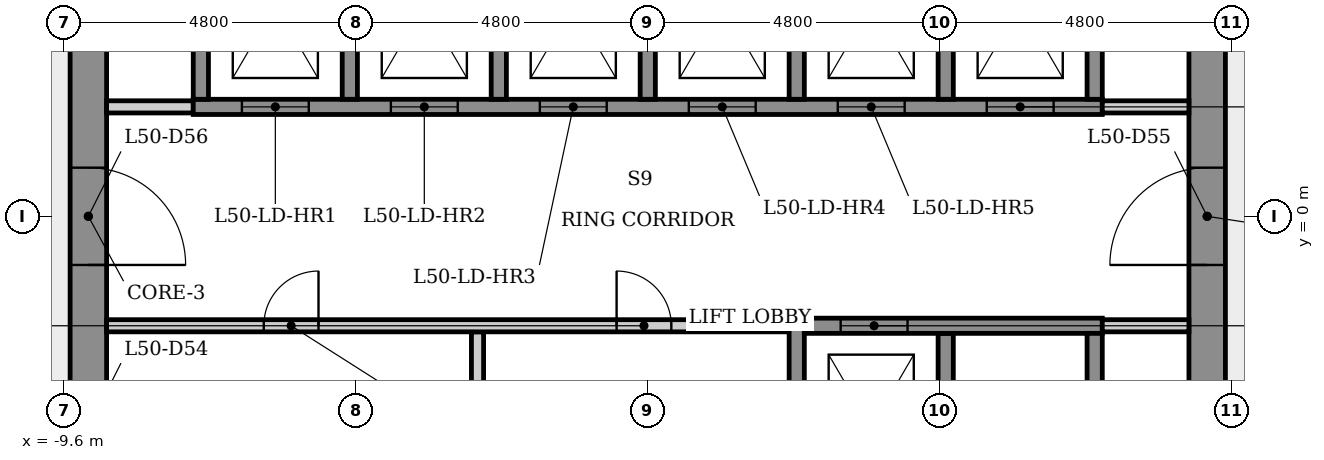
"""IFC4 building model, lengths in metres.
Left out: names, types, materials, properties, quantities, classifications, styles, units other than length and angle.
Written with IfcOpenShell. Run it as: python <this file> out.ifc"""

import sys

from ifc_helpers import new_model, si_unit, direction, frame, frame_2d, origin, place, context, subcontext, project, spatial, rectangle, extrude, element, fill, save


model = new_model("IFC4")
c1 = context("Model", 3, precision=1e-05, world=origin(), true_north=direction((0.0, 1.0)))
c2 = subcontext(c1, "Body", "Model", "MODEL_VIEW")
j1 = project(units=[si_unit("LENGTHUNIT", "METRE"), si_unit("PLANEANGLEUNIT", "RADIAN")], contexts=[c1])
p1 = place(None, origin())
s1 = spatial("IfcSite", under=j1, at=p1, CompositionType="ELEMENT")
p2 = place(p1, origin())
s2 = spatial("IfcBuilding", under=s1, at=p2, CompositionType="ELEMENT")
p3 = place(p2, frame((0.0, 0.0, 186.7)))
s3 = spatial("IfcBuildingStorey", under=s2, at=p3, CompositionType="ELEMENT", Elevation=186.7)
p4 = place(p3, frame((9.2, -5.485, 0.0), z_axis=(0.0, 0.0, 1.0), x_axis=(0.0, 1.0, 0.0)))
e1 = element("IfcWall", 1, at=p4, inside=s3, PredefinedType="SHEAR", context=c2, shape_type="SweptSolid", body=[
    extrude(rectangle(XDim=10.97, YDim=0.6, at=frame_2d((5.485, 0.0))), origin(), (0.0, 0.0, 1.0), 4.0),
])
p5 = place(p4, frame((4.685, 0.0, 0.0)))
e2 = element("IfcOpeningElement", 2, at=p5, cuts=e1, PredefinedType="OPENING", context=c2, shape_type="SweptSolid", body=[
    extrude(rectangle(XDim=1.6, YDim=2.1, at=frame_2d((0.8, 1.05))), frame((0.0, 0.31, 0.0), z_axis=(0.0, -1.0, 0.0), x_axis=(1.0, 0.0, 0.0)), (0.0, 0.0, 1.0), 0.62),
])
p6 = place(p3, frame((-9.2, 5.485, 0.0), z_axis=(0.0, 0.0, 1.0), x_axis=(0.0, -1.0, 0.0)))
e3 = element("IfcWall", 3, at=p6, inside=s3, PredefinedType="SHEAR", context=c2, shape_type="SweptSolid", body=[
    extrude(rectangle(XDim=10.97, YDim=0.6, at=frame_2d((5.485, 0.0))), origin(), (0.0, 0.0, 1.0), 4.0),
])
p7 = place(p6, frame((8.516, 0.0, 0.0)))
e4 = element("IfcOpeningElement", 4, at=p7, cuts=e3, PredefinedType="OPENING", context=c2, shape_type="SweptSolid", body=[
    extrude(rectangle(XDim=0.9, YDim=2.1, at=frame_2d((0.45, 1.05))), frame((0.0, 0.31, 0.0), z_axis=(0.0, -1.0, 0.0), x_axis=(1.0, 0.0, 0.0)), (0.0, 0.0, 1.0), 0.62),
])
p8 = place(p6, frame((4.685, 0.0, 0.0)))
e5 = element("IfcOpeningElement", 5, at=p8, cuts=e3, PredefinedType="OPENING", context=c2, shape_type="SweptSolid", body=[
    extrude(rectangle(XDim=1.6, YDim=2.1, at=frame_2d((0.8, 1.05))), frame((0.0, 0.31, 0.0), z_axis=(0.0, -1.0, 0.0), x_axis=(1.0, 0.0, 0.0)), (0.0, 0.0, 1.0), 0.62),
])
p9 = place(p3, frame((-8.9, 1.8, 0.0), z_axis=(0.0, 0.0, 1.0), x_axis=(1.0, 0.0, 0.0)))
e6 = element("IfcWall", 6, at=p9, inside=s3, PredefinedType="PARTITIONING", context=c2, shape_type="SweptSolid", body=[
    extrude(rectangle(XDim=1.425, YDim=0.2, at=frame_2d((0.712, 0.0))), origin(), (0.0, 0.0, 1.0), 3.6),
])
p10 = place(p3, frame((-7.475, 1.8, 0.0), z_axis=(0.0, 0.0, 1.0), x_axis=(1.0, 0.0, 0.0)))
e7 = element("IfcWall", 7, at=p10, inside=s3, PredefinedType="SHEAR", context=c2, shape_type="SweptSolid", body=[
    extrude(rectangle(XDim=14.95, YDim=0.25, at=frame_2d((7.475, 0.0))), origin(), (0.0, 0.0, 1.0), 3.6),
])
p11 = place(p10, frame((0.8, 0.0, 0.0)))
e8 = element("IfcOpeningElement", 8, at=p11, cuts=e7, PredefinedType="OPENING", context=c2, shape_type="SweptSolid", body=[
    extrude(rectangle(XDim=1.1, YDim=2.1, at=frame_2d((0.55, 1.05))), frame((0.0, 0.135, 0.0), z_axis=(0.0, -1.0, 0.0), x_axis=(1.0, 0.0, 0.0)), (0.0, 0.0, 1.0), 0.27),
])
p12 = place(p10, frame((3.25, 0.0, 0.0)))
e9 = element("IfcOpeningElement", 9, at=p12, cuts=e7, PredefinedType="OPENING", context=c2, shape_type="SweptSolid", body=[
    extrude(rectangle(XDim=1.1, YDim=2.1, at=frame_2d((0.55, 1.05))), frame((0.0, 0.135, 0.0), z_axis=(0.0, -1.0, 0.0), x_axis=(1.0, 0.0, 0.0)), (0.0, 0.0, 1.0), 0.27),
])
p13 = place(p10, frame((5.7, 0.0, 0.0)))
e10 = element("IfcOpeningElement", 10, at=p13, cuts=e7, PredefinedType="OPENING", context=c2, shape_type="SweptSolid", body=[
    extrude(rectangle(XDim=1.1, YDim=2.1, at=frame_2d((0.55, 1.05))), frame((0.0, 0.135, 0.0), z_axis=(0.0, -1.0, 0.0), x_axis=(1.0, 0.0, 0.0)), (0.0, 0.0, 1.0), 0.27),
])
p14 = place(p10, frame((8.15, 0.0, 0.0)))
e11 = element("IfcOpeningElement", 11, at=p14, cuts=e7, PredefinedType="OPENING", context=c2, shape_type="SweptSolid", body=[
    extrude(rectangle(XDim=1.1, YDim=2.1, at=frame_2d((0.55, 1.05))), frame((0.0, 0.135, 0.0), z_axis=(0.0, -1.0, 0.0), x_axis=(1.0, 0.0, 0.0)), (0.0, 0.0, 1.0), 0.27),
])
p15 = place(p10, frame((10.6, 0.0, 0.0)))
e12 = element("IfcOpeningElement", 12, at=p15, cuts=e7, PredefinedType="OPENING", context=c2, shape_type="SweptSolid", body=[
    extrude(rectangle(XDim=1.1, YDim=2.1, at=frame_2d((0.55, 1.05))), frame((0.0, 0.135, 0.0), z_axis=(0.0, -1.0, 0.0), x_axis=(1.0, 0.0, 0.0)), (0.0, 0.0, 1.0), 0.27),
])
p16 = place(p10, frame((13.05, 0.0, 0.0)))
e13 = element("IfcOpeningElement", 13, at=p16, cuts=e7, PredefinedType="OPENING", context=c2, shape_type="SweptSolid", body=[
    extrude(rectangle(XDim=1.1, YDim=2.1, at=frame_2d((0.55, 1.05))), frame((0.0, 0.135, 0.0), z_axis=(0.0, -1.0, 0.0), x_axis=(1.0, 0.0, 0.0)), (0.0, 0.0, 1.0), 0.27),
])
p17 = place(p3, frame((-7.35, 1.925, 0.0), z_axis=(0.0, 0.0, 1.0), x_axis=(0.0, 1.0, 0.0)))
e14 = element("IfcWall", 14, at=p17, inside=s3, PredefinedType="SHEAR", context=c2, shape_type="SweptSolid", body=[
    extrude(rectangle(XDim=4.036, YDim=0.25, at=frame_2d((2.018, 0.0))), origin(), (0.0, 0.0, 1.0), 3.6),
])
p18 = place(p3, frame((-4.9, 5.025, 0.0), z_axis=(0.0, 0.0, 1.0), x_axis=(0.0, -1.0, 0.0)))
e15 = element("IfcWall", 15, at=p18, inside=s3, PredefinedType="SHEAR", context=c2, shape_type="SweptSolid", body=[
    extrude(rectangle(XDim=3.1, YDim=0.25, at=frame_2d((1.55, 0.0))), origin(), (0.0, 0.0, 1.0), 4.0),
])
p19 = place(p3, frame((-2.8, -1.9, 0.0), z_axis=(0.0, 0.0, 1.0), x_axis=(0.0, -1.0, 0.0)))
e16 = element("IfcWall", 16, at=p19, inside=s3, PredefinedType="PARTITIONING", context=c2, shape_type="SweptSolid", body=[
    extrude(rectangle(XDim=3.15, YDim=0.2, at=frame_2d((1.575, 0.0))), origin(), (0.0, 0.0, 1.0), 3.6),
])
p20 = place(p3, frame((-8.9, -1.8, 0.0), z_axis=(0.0, 0.0, 1.0), x_axis=(1.0, 0.0, 0.0)))
e17 = element("IfcWall", 17, at=p20, inside=s3, PredefinedType="PARTITIONING", context=c2, shape_type="SweptSolid", body=[
    extrude(rectangle(XDim=11.225, YDim=0.2, at=frame_2d((5.613, 0.0))), origin(), (0.0, 0.0, 1.0), 3.6),
])
p21 = place(p20, frame((2.585, 0.0, 0.0)))
e18 = element("IfcOpeningElement", 18, at=p21, cuts=e17, PredefinedType="OPENING", context=c2, shape_type="SweptSolid", body=[
    extrude(rectangle(XDim=0.9, YDim=2.1, at=frame_2d((0.45, 1.05))), frame((0.0, 0.11, 0.0), z_axis=(0.0, -1.0, 0.0), x_axis=(1.0, 0.0, 0.0)), (0.0, 0.0, 1.0), 0.22),
])
p22 = place(p20, frame((8.387, 0.0, 0.0)))
e19 = element("IfcOpeningElement", 19, at=p22, cuts=e17, PredefinedType="OPENING", context=c2, shape_type="SweptSolid", body=[
    extrude(rectangle(XDim=0.9, YDim=2.1, at=frame_2d((0.45, 1.05))), frame((0.0, 0.11, 0.0), z_axis=(0.0, -1.0, 0.0), x_axis=(1.0, 0.0, 0.0)), (0.0, 0.0, 1.0), 0.22),
])
for number, where, z_axis, x_axis in (
    (20, (-2.45, 5.025, 0.0), (0.0, 0.0, 1.0), (0.0, -1.0, 0.0)),
    (21, (0.0, 5.025, 0.0), (0.0, 0.0, 1.0), (0.0, -1.0, 0.0)),
):
    element("IfcWall", number, at=place(p3, frame(where, z_axis=z_axis, x_axis=x_axis)), inside=s3, PredefinedType="SHEAR", context=c2, shape_type="SweptSolid", body=[
        extrude(rectangle(XDim=3.1, YDim=0.25, at=frame_2d((1.55, 0.0))), origin(), (0.0, 0.0, 1.0), 4.0),
    ])
p23 = place(p3, frame((2.45, -5.275, 0.0), z_axis=(0.0, 0.0, 1.0), x_axis=(0.0, 1.0, 0.0)))
e22 = element("IfcWall", 22, at=p23, inside=s3, PredefinedType="SHEAR", context=c2, shape_type="SweptSolid", body=[
    extrude(rectangle(XDim=3.6, YDim=0.25, at=frame_2d((1.8, 0.0))), origin(), (0.0, 0.0, 1.0), 3.6),
])
for number, where, z_axis, x_axis in (
    (23, (2.45, 5.025, 0.0), (0.0, 0.0, 1.0), (0.0, -1.0, 0.0)),
    (24, (4.9, -1.925, 0.0), (0.0, 0.0, 1.0), (0.0, -1.0, 0.0)),
    (25, (4.9, 5.025, 0.0), (0.0, 0.0, 1.0), (0.0, -1.0, 0.0)),
):
    element("IfcWall", number, at=place(p3, frame(where, z_axis=z_axis, x_axis=x_axis)), inside=s3, PredefinedType="SHEAR", context=c2, shape_type="SweptSolid", body=[
        extrude(rectangle(XDim=3.1, YDim=0.25, at=frame_2d((1.55, 0.0))), origin(), (0.0, 0.0, 1.0), 4.0),
    ])
p24 = place(p3, frame((2.575, -1.8, 0.0), z_axis=(0.0, 0.0, 1.0), x_axis=(1.0, 0.0, 0.0)))
e26 = element("IfcWall", 26, at=p24, inside=s3, PredefinedType="SHEAR", context=c2, shape_type="SweptSolid", body=[
    extrude(rectangle(XDim=4.9, YDim=0.25, at=frame_2d((2.45, 0.0))), origin(), (0.0, 0.0, 1.0), 3.6),
])
p25 = place(p24, frame((0.597, 0.0, 0.0)))
e27 = element("IfcOpeningElement", 27, at=p25, cuts=e26, PredefinedType="OPENING", context=c2, shape_type="SweptSolid", body=[
    extrude(rectangle(XDim=1.1, YDim=2.1, at=frame_2d((0.55, 1.05))), frame((0.0, 0.135, 0.0), z_axis=(0.0, -1.0, 0.0), x_axis=(1.0, 0.0, 0.0)), (0.0, 0.0, 1.0), 0.27),
])
p26 = place(p3, frame((7.475, 1.8, 0.0), z_axis=(0.0, 0.0, 1.0), x_axis=(1.0, 0.0, 0.0)))
e28 = element("IfcWall", 28, at=p26, inside=s3, PredefinedType="PARTITIONING", context=c2, shape_type="SweptSolid", body=[
    extrude(rectangle(XDim=1.425, YDim=0.2, at=frame_2d((0.712, 0.0))), origin(), (0.0, 0.0, 1.0), 3.6),
])
for number, where, z_axis, x_axis in (
    (29, (7.35, -1.925, 0.0), (0.0, 0.0, 1.0), (0.0, -1.0, 0.0)),
    (30, (7.35, 5.025, 0.0), (0.0, 0.0, 1.0), (0.0, -1.0, 0.0)),
):
    element("IfcWall", number, at=place(p3, frame(where, z_axis=z_axis, x_axis=x_axis)), inside=s3, PredefinedType="SHEAR", context=c2, shape_type="SweptSolid", body=[
        extrude(rectangle(XDim=3.1, YDim=0.25, at=frame_2d((1.55, 0.0))), origin(), (0.0, 0.0, 1.0), 4.0),
    ])
p27 = place(p3, frame((8.9, -1.8, 0.0), z_axis=(0.0, 0.0, 1.0), x_axis=(-1.0, 0.0, 0.0)))
e31 = element("IfcWall", 31, at=p27, inside=s3, PredefinedType="PARTITIONING", context=c2, shape_type="SweptSolid", body=[
    extrude(rectangle(XDim=1.425, YDim=0.2, at=frame_2d((0.712, 0.0))), origin(), (0.0, 0.0, 1.0), 3.6),
])
p28 = place(p11, origin())
e32 = element("IfcDoor", 32, at=p28, inside=s3, OperationType="SLIDING_TO_LEFT", PredefinedType="DOOR", context=c2, shape_type="SweptSolid", body=[
    extrude(rectangle(XDim=1.1, YDim=2.1, at=frame_2d((0.55, 1.05))), frame((0.0, 0.025, 0.0), z_axis=(0.0, -1.0, 0.0), x_axis=(1.0, 0.0, 0.0)), (0.0, 0.0, 1.0), 0.05),
])
fill(e8, e32)
p29 = place(p12, origin())
e33 = element("IfcDoor", 33, at=p29, inside=s3, OperationType="SLIDING_TO_LEFT", PredefinedType="DOOR", context=c2, shape_type="SweptSolid", body=[
    extrude(rectangle(XDim=1.1, YDim=2.1, at=frame_2d((0.55, 1.05))), frame((0.0, 0.025, 0.0), z_axis=(0.0, -1.0, 0.0), x_axis=(1.0, 0.0, 0.0)), (0.0, 0.0, 1.0), 0.05),
])
fill(e9, e33)
p30 = place(p13, origin())
e34 = element("IfcDoor", 34, at=p30, inside=s3, OperationType="SLIDING_TO_LEFT", PredefinedType="DOOR", context=c2, shape_type="SweptSolid", body=[
    extrude(rectangle(XDim=1.1, YDim=2.1, at=frame_2d((0.55, 1.05))), frame((0.0, 0.025, 0.0), z_axis=(0.0, -1.0, 0.0), x_axis=(1.0, 0.0, 0.0)), (0.0, 0.0, 1.0), 0.05),
])
fill(e10, e34)
p31 = place(p14, origin())
e35 = element("IfcDoor", 35, at=p31, inside=s3, OperationType="SLIDING_TO_LEFT", PredefinedType="DOOR", context=c2, shape_type="SweptSolid", body=[
    extrude(rectangle(XDim=1.1, YDim=2.1, at=frame_2d((0.55, 1.05))), frame((0.0, 0.025, 0.0), z_axis=(0.0, -1.0, 0.0), x_axis=(1.0, 0.0, 0.0)), (0.0, 0.0, 1.0), 0.05),
])
fill(e11, e35)
p32 = place(p15, origin())
e36 = element("IfcDoor", 36, at=p32, inside=s3, OperationType="SLIDING_TO_LEFT", PredefinedType="DOOR", context=c2, shape_type="SweptSolid", body=[
    extrude(rectangle(XDim=1.1, YDim=2.1, at=frame_2d((0.55, 1.05))), frame((0.0, 0.025, 0.0), z_axis=(0.0, -1.0, 0.0), x_axis=(1.0, 0.0, 0.0)), (0.0, 0.0, 1.0), 0.05),
])
fill(e12, e36)
p33 = place(p16, origin())
e37 = element("IfcDoor", 37, at=p33, inside=s3, OperationType="SLIDING_TO_LEFT", PredefinedType="DOOR", context=c2, shape_type="SweptSolid", body=[
    extrude(rectangle(XDim=1.1, YDim=2.1, at=frame_2d((0.55, 1.05))), frame((0.0, 0.025, 0.0), z_axis=(0.0, -1.0, 0.0), x_axis=(1.0, 0.0, 0.0)), (0.0, 0.0, 1.0), 0.05),
])
fill(e13, e37)
p34 = place(p25, origin())
e38 = element("IfcDoor", 38, at=p34, inside=s3, OperationType="SLIDING_TO_LEFT", PredefinedType="DOOR", context=c2, shape_type="SweptSolid", body=[
    extrude(rectangle(XDim=1.1, YDim=2.1, at=frame_2d((0.55, 1.05))), frame((0.0, 0.025, 0.0), z_axis=(0.0, -1.0, 0.0), x_axis=(1.0, 0.0, 0.0)), (0.0, 0.0, 1.0), 0.05),
])
fill(e27, e38)
p35 = place(p21, origin())
e39 = element("IfcDoor", 39, at=p35, inside=s3, OperationType="SINGLE_SWING_RIGHT", PredefinedType="DOOR", context=c2, shape_type="SweptSolid", body=[
    extrude(rectangle(XDim=0.9, YDim=2.1, at=frame_2d((0.45, 1.05))), frame((0.0, 0.025, 0.0), z_axis=(0.0, -1.0, 0.0), x_axis=(1.0, 0.0, 0.0)), (0.0, 0.0, 1.0), 0.05),
])
fill(e18, e39)
p36 = place(p22, origin())
e40 = element("IfcDoor", 40, at=p36, inside=s3, OperationType="SINGLE_SWING_LEFT", PredefinedType="DOOR", context=c2, shape_type="SweptSolid", body=[
    extrude(rectangle(XDim=0.9, YDim=2.1, at=frame_2d((0.45, 1.05))), frame((0.0, 0.025, 0.0), z_axis=(0.0, -1.0, 0.0), x_axis=(1.0, 0.0, 0.0)), (0.0, 0.0, 1.0), 0.05),
])
fill(e19, e40)
p37 = place(p5, origin())
e41 = element("IfcDoor", 41, at=p37, inside=s3, OperationType="SINGLE_SWING_LEFT", PredefinedType="DOOR", context=c2, shape_type="SweptSolid", body=[
    extrude(rectangle(XDim=1.6, YDim=2.1, at=frame_2d((0.8, 1.05))), frame((0.0, 0.025, 0.0), z_axis=(0.0, -1.0, 0.0), x_axis=(1.0, 0.0, 0.0)), (0.0, 0.0, 1.0), 0.05),
])
fill(e2, e41)
p38 = place(p8, origin())
e42 = element("IfcDoor", 42, at=p38, inside=s3, OperationType="SINGLE_SWING_RIGHT", PredefinedType="DOOR", context=c2, shape_type="SweptSolid", body=[
    extrude(rectangle(XDim=1.6, YDim=2.1, at=frame_2d((0.8, 1.05))), frame((0.0, 0.025, 0.0), z_axis=(0.0, -1.0, 0.0), x_axis=(1.0, 0.0, 0.0)), (0.0, 0.0, 1.0), 0.05),
])
fill(e5, e42)
save(model, sys.argv[1])
